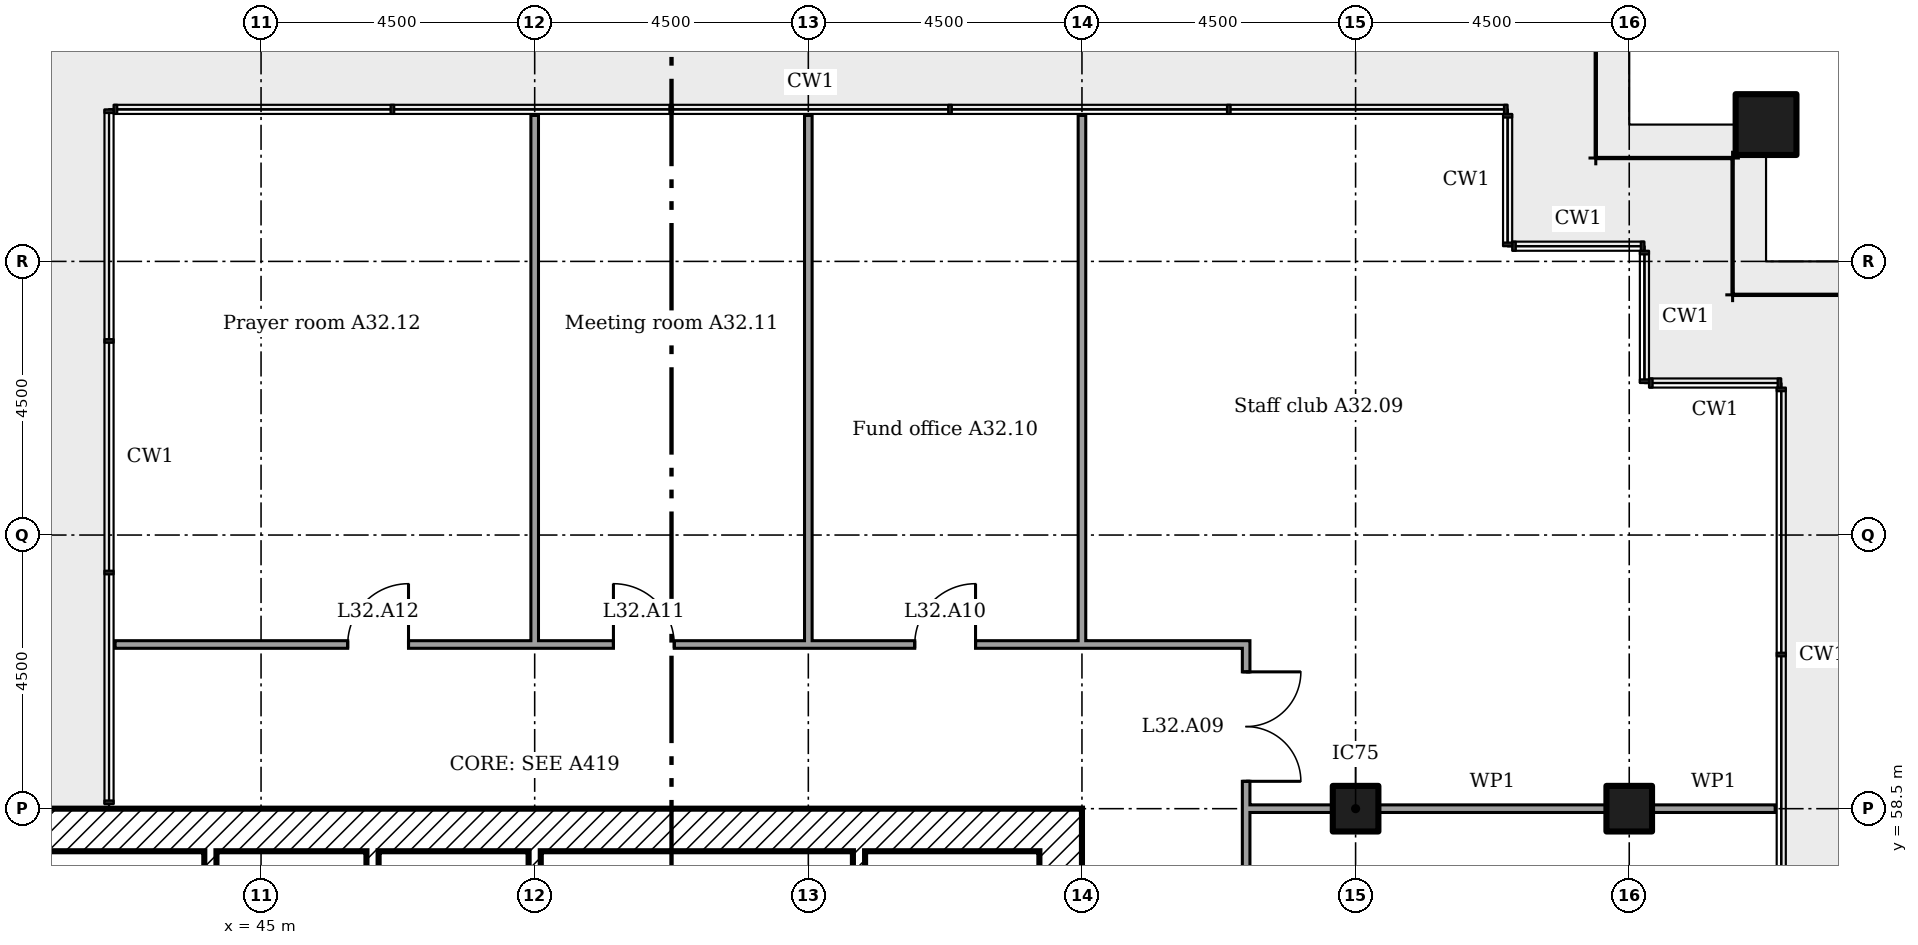
"""IFC4 building model, lengths in metres.
Left out: names, types, materials, properties, quantities, classifications, styles, units other than length and angle.
Written with IfcOpenShell. Run it as: python <this file> out.ifc"""

import sys

from ifc_helpers import new_model, si_unit, direction, frame, frame_2d, origin, origin_2d, place, context, subcontext, project, spatial, rectangle, extrude, element, fill, save


model = new_model("IFC4")
c1 = context("Model", 3, precision=1e-05, world=origin(), true_north=direction((0.0, 1.0)))
c2 = subcontext(c1, "Body", "Model", "MODEL_VIEW")
j1 = project(units=[si_unit("LENGTHUNIT", "METRE"), si_unit("PLANEANGLEUNIT", "RADIAN")], contexts=[c1])
p1 = place(None, origin())
s1 = spatial("IfcSite", under=j1, at=p1, CompositionType="ELEMENT")
p2 = place(p1, origin())
s2 = spatial("IfcBuilding", under=s1, at=p2, CompositionType="ELEMENT")
p3 = place(p2, frame((0.0, 0.0, 131.6)))
s3 = spatial("IfcBuildingStorey", under=s2, at=p3, CompositionType="ELEMENT", Elevation=131.6)
p4 = place(p3, frame((69.75, 69.75, 0.0)))
e1 = element("IfcColumn", 1, at=p4, inside=s3, PredefinedType="COLUMN", context=c2, shape_type="SweptSolid", body=[
    extrude(rectangle(XDim=1.0, YDim=1.0, at=origin_2d()), origin(), (0.0, 0.0, 1.0), 3.6),
])
for number, where in (
    (2, (63.0, 58.5, 0.0)),
    (3, (67.5, 58.5, 0.0)),
):
    element("IfcColumn", number, at=place(p3, frame(where)), inside=s3, PredefinedType="COLUMN", context=c2, shape_type="SweptSolid", body=[
        extrude(rectangle(XDim=0.75, YDim=0.75, at=origin_2d()), origin(), (0.0, 0.0, 1.0), 3.6),
    ])
p5 = place(p3, frame((58.15, 40.5, 0.0), z_axis=(0.0, 0.0, 1.0), x_axis=(0.0, 1.0, 0.0)))
e4 = element("IfcWall", 4, at=p5, inside=s3, PredefinedType="SHEAR", context=c2, shape_type="SweptSolid", body=[
    extrude(rectangle(XDim=18.0, YDim=0.7, at=frame_2d((9.0, 0.0))), origin(), (0.0, 0.0, 1.0), 3.35),
])
p6 = place(p5, frame((13.15, 0.0, 0.0)))
e5 = element("IfcOpeningElement", 5, at=p6, cuts=e4, PredefinedType="OPENING", context=c2, shape_type="SweptSolid", body=[
    extrude(rectangle(XDim=1.2, YDim=2.1, at=frame_2d((0.6, 1.05))), frame((0.0, 0.36, 0.0), z_axis=(0.0, -1.0, 0.0), x_axis=(1.0, 0.0, 0.0)), (0.0, 0.0, 1.0), 0.72),
])
p7 = place(p5, frame((3.9, 0.0, 0.0)))
e6 = element("IfcOpeningElement", 6, at=p7, cuts=e4, PredefinedType="OPENING", context=c2, shape_type="SweptSolid", body=[
    extrude(rectangle(XDim=1.8, YDim=2.1, at=frame_2d((0.9, 1.05))), frame((0.0, 0.36, 0.0), z_axis=(0.0, -1.0, 0.0), x_axis=(1.0, 0.0, 0.0)), (0.0, 0.0, 1.0), 0.72),
])
p8 = place(p5, frame((11.525, 0.0, 0.0)))
e7 = element("IfcOpeningElement", 7, at=p8, cuts=e4, PredefinedType="OPENING", context=c2, shape_type="SweptSolid", body=[
    extrude(rectangle(XDim=1.0, YDim=2.1, at=frame_2d((0.5, 1.05))), frame((0.0, 0.36, 0.0), z_axis=(0.0, -1.0, 0.0), x_axis=(1.0, 0.0, 0.0)), (0.0, 0.0, 1.0), 0.72),
])
p9 = place(p3, frame((41.2, 58.15, 0.0)))
e8 = element("IfcWall", 8, at=p9, inside=s3, PredefinedType="SHEAR", context=c2, shape_type="SweptSolid", body=[
    extrude(rectangle(XDim=16.6, YDim=0.7, at=frame_2d((8.3, 0.0))), origin(), (0.0, 0.0, 1.0), 3.35),
])
p10 = place(p3, frame((44.167, 57.8, 0.0), z_axis=(0.0, 0.0, 1.0), x_axis=(0.0, -1.0, 0.0)))
e9 = element("IfcWall", 9, at=p10, inside=s3, PredefinedType="SHEAR", context=c2, shape_type="SweptSolid", body=[
    extrude(rectangle(XDim=3.4, YDim=0.2, at=frame_2d((1.7, 0.0))), origin(), (0.0, 0.0, 1.0), 3.35),
])
p11 = place(p3, frame((46.833, 57.8, 0.0), z_axis=(0.0, 0.0, 1.0), x_axis=(0.0, -1.0, 0.0)))
e10 = element("IfcWall", 10, at=p11, inside=s3, PredefinedType="SHEAR", context=c2, shape_type="SweptSolid", body=[
    extrude(rectangle(XDim=4.5, YDim=0.2, at=frame_2d((2.25, 0.0))), origin(), (0.0, 0.0, 1.0), 3.35),
])
for number, where, z_axis, x_axis in (
    (11, (49.5, 57.8, 0.0), (0.0, 0.0, 1.0), (0.0, -1.0, 0.0)),
    (12, (54.833, 57.8, 0.0), (0.0, 0.0, 1.0), (0.0, -1.0, 0.0)),
):
    element("IfcWall", number, at=place(p3, frame(where, z_axis=z_axis, x_axis=x_axis)), inside=s3, PredefinedType="SHEAR", context=c2, shape_type="SweptSolid", body=[
        extrude(rectangle(XDim=2.6, YDim=0.2, at=frame_2d((1.3, 0.0))), origin(), (0.0, 0.0, 1.0), 3.35),
    ])
p12 = place(p3, frame((61.2, 58.5, 0.0)))
e13 = element("IfcWall", 13, at=p12, inside=s3, PredefinedType="PARTITIONING", context=c2, shape_type="SweptSolid", body=[
    extrude(rectangle(XDim=1.425, YDim=0.125, at=frame_2d((0.712, 0.0))), origin(), (0.0, 0.0, 1.0), 2.676),
])
p13 = place(p3, frame((63.375, 58.5, 0.0)))
e14 = element("IfcWall", 14, at=p13, inside=s3, PredefinedType="PARTITIONING", context=c2, shape_type="SweptSolid", body=[
    extrude(rectangle(XDim=3.75, YDim=0.125, at=frame_2d((1.875, 0.0))), origin(), (0.0, 0.0, 1.0), 2.676),
])
p14 = place(p3, frame((67.875, 58.5, 0.0)))
e15 = element("IfcWall", 15, at=p14, inside=s3, PredefinedType="PARTITIONING", context=c2, shape_type="SweptSolid", body=[
    extrude(rectangle(XDim=2.025, YDim=0.125, at=frame_2d((1.012, 0.0))), origin(), (0.0, 0.0, 1.0), 2.676),
])
p15 = place(p3, frame((42.6, 61.2, 0.0)))
e16 = element("IfcWall", 16, at=p15, inside=s3, PredefinedType="PARTITIONING", context=c2, shape_type="SweptSolid", body=[
    extrude(rectangle(XDim=18.662, YDim=0.125, at=frame_2d((9.331, 0.0))), origin(), (0.0, 0.0, 1.0), 3.45),
])
p16 = place(p15, frame((13.15, 0.0, 0.0)))
e17 = element("IfcOpeningElement", 17, at=p16, cuts=e16, PredefinedType="OPENING", context=c2, shape_type="SweptSolid", body=[
    extrude(rectangle(XDim=1.0, YDim=2.1, at=frame_2d((0.5, 1.05))), frame((0.0, 0.073, 0.0), z_axis=(0.0, -1.0, 0.0), x_axis=(1.0, 0.0, 0.0)), (0.0, 0.0, 1.0), 0.145),
])
p17 = place(p15, frame((8.195, 0.0, 0.0)))
e18 = element("IfcOpeningElement", 18, at=p17, cuts=e16, PredefinedType="OPENING", context=c2, shape_type="SweptSolid", body=[
    extrude(rectangle(XDim=1.0, YDim=2.1, at=frame_2d((0.5, 1.05))), frame((0.0, 0.073, 0.0), z_axis=(0.0, -1.0, 0.0), x_axis=(1.0, 0.0, 0.0)), (0.0, 0.0, 1.0), 0.145),
])
p18 = place(p15, frame((3.825, 0.0, 0.0)))
e19 = element("IfcOpeningElement", 19, at=p18, cuts=e16, PredefinedType="OPENING", context=c2, shape_type="SweptSolid", body=[
    extrude(rectangle(XDim=1.0, YDim=2.1, at=frame_2d((0.5, 1.05))), frame((0.0, 0.073, 0.0), z_axis=(0.0, -1.0, 0.0), x_axis=(1.0, 0.0, 0.0)), (0.0, 0.0, 1.0), 0.145),
])
for number, where, z_axis, x_axis in (
    (20, (49.5, 61.2, 0.0), (0.0, 0.0, 1.0), (0.0, 1.0, 0.0)),
    (21, (54.0, 61.2, 0.0), (0.0, 0.0, 1.0), (0.0, 1.0, 0.0)),
    (22, (58.5, 61.2, 0.0), (0.0, 0.0, 1.0), (0.0, 1.0, 0.0)),
):
    element("IfcWall", number, at=place(p3, frame(where, z_axis=z_axis, x_axis=x_axis)), inside=s3, PredefinedType="PARTITIONING", context=c2, shape_type="SweptSolid", body=[
        extrude(rectangle(XDim=8.7, YDim=0.125, at=frame_2d((4.35, 0.0))), origin(), (0.0, 0.0, 1.0), 2.766),
    ])
p19 = place(p3, frame((61.2, 37.863, 0.0), z_axis=(0.0, 0.0, 1.0), x_axis=(0.0, 1.0, 0.0)))
e23 = element("IfcWall", 23, at=p19, inside=s3, PredefinedType="PARTITIONING", context=c2, shape_type="SweptSolid", body=[
    extrude(rectangle(XDim=23.275, YDim=0.125, at=frame_2d((11.637, 0.0))), origin(), (0.0, 0.0, 1.0), 3.45),
])
p20 = place(p19, frame((3.933, 0.0, 0.0)))
e24 = element("IfcOpeningElement", 24, at=p20, cuts=e23, PredefinedType="OPENING", context=c2, shape_type="SweptSolid", body=[
    extrude(rectangle(XDim=1.0, YDim=2.1, at=frame_2d((0.5, 1.05))), frame((0.0, 0.073, 0.0), z_axis=(0.0, -1.0, 0.0), x_axis=(1.0, 0.0, 0.0)), (0.0, 0.0, 1.0), 0.145),
])
p21 = place(p19, frame((9.343, 0.0, 0.0)))
e25 = element("IfcOpeningElement", 25, at=p21, cuts=e23, PredefinedType="OPENING", context=c2, shape_type="SweptSolid", body=[
    extrude(rectangle(XDim=1.0, YDim=2.1, at=frame_2d((0.5, 1.05))), frame((0.0, 0.073, 0.0), z_axis=(0.0, -1.0, 0.0), x_axis=(1.0, 0.0, 0.0)), (0.0, 0.0, 1.0), 0.145),
])
p22 = place(p19, frame((13.387, 0.0, 0.0)))
e26 = element("IfcOpeningElement", 26, at=p22, cuts=e23, PredefinedType="OPENING", context=c2, shape_type="SweptSolid", body=[
    extrude(rectangle(XDim=1.0, YDim=2.1, at=frame_2d((0.5, 1.05))), frame((0.0, 0.073, 0.0), z_axis=(0.0, -1.0, 0.0), x_axis=(1.0, 0.0, 0.0)), (0.0, 0.0, 1.0), 0.145),
])
p23 = place(p19, frame((17.433, 0.0, 0.0)))
e27 = element("IfcOpeningElement", 27, at=p23, cuts=e23, PredefinedType="OPENING", context=c2, shape_type="SweptSolid", body=[
    extrude(rectangle(XDim=1.0, YDim=2.1, at=frame_2d((0.5, 1.05))), frame((0.0, 0.073, 0.0), z_axis=(0.0, -1.0, 0.0), x_axis=(1.0, 0.0, 0.0)), (0.0, 0.0, 1.0), 0.145),
])
p24 = place(p19, frame((21.087, 0.0, 0.0)))
e28 = element("IfcOpeningElement", 28, at=p24, cuts=e23, PredefinedType="OPENING", context=c2, shape_type="SweptSolid", body=[
    extrude(rectangle(XDim=1.8, YDim=2.1, at=frame_2d((0.9, 1.05))), frame((0.0, 0.073, 0.0), z_axis=(0.0, -1.0, 0.0), x_axis=(1.0, 0.0, 0.0)), (0.0, 0.0, 1.0), 0.145),
])
p25 = place(p24, frame((1.8, 0.0, 0.0), x_axis=(-1.0, 0.0, 0.0)))
e29 = element("IfcDoor", 29, at=p25, inside=s3, OperationType="DOUBLE_DOOR_SINGLE_SWING", PredefinedType="DOOR", context=c2, shape_type="SweptSolid", body=[
    extrude(rectangle(XDim=1.8, YDim=2.1, at=frame_2d((0.9, 1.05))), frame((0.0, 0.025, 0.0), z_axis=(0.0, -1.0, 0.0), x_axis=(1.0, 0.0, 0.0)), (0.0, 0.0, 1.0), 0.05),
])
fill(e28, e29)
p26 = place(p16, origin())
e30 = element("IfcDoor", 30, at=p26, inside=s3, OperationType="SINGLE_SWING_LEFT", PredefinedType="DOOR", context=c2, shape_type="SweptSolid", body=[
    extrude(rectangle(XDim=1.0, YDim=2.1, at=frame_2d((0.5, 1.05))), frame((0.0, 0.025, 0.0), z_axis=(0.0, -1.0, 0.0), x_axis=(1.0, 0.0, 0.0)), (0.0, 0.0, 1.0), 0.05),
])
fill(e17, e30)
p27 = place(p17, origin())
e31 = element("IfcDoor", 31, at=p27, inside=s3, OperationType="SINGLE_SWING_RIGHT", PredefinedType="DOOR", context=c2, shape_type="SweptSolid", body=[
    extrude(rectangle(XDim=1.0, YDim=2.1, at=frame_2d((0.5, 1.05))), frame((0.0, 0.025, 0.0), z_axis=(0.0, -1.0, 0.0), x_axis=(1.0, 0.0, 0.0)), (0.0, 0.0, 1.0), 0.05),
])
fill(e18, e31)
p28 = place(p18, origin())
e32 = element("IfcDoor", 32, at=p28, inside=s3, OperationType="SINGLE_SWING_LEFT", PredefinedType="DOOR", context=c2, shape_type="SweptSolid", body=[
    extrude(rectangle(XDim=1.0, YDim=2.1, at=frame_2d((0.5, 1.05))), frame((0.0, 0.025, 0.0), z_axis=(0.0, -1.0, 0.0), x_axis=(1.0, 0.0, 0.0)), (0.0, 0.0, 1.0), 0.05),
])
fill(e19, e32)
save(model, sys.argv[1])
